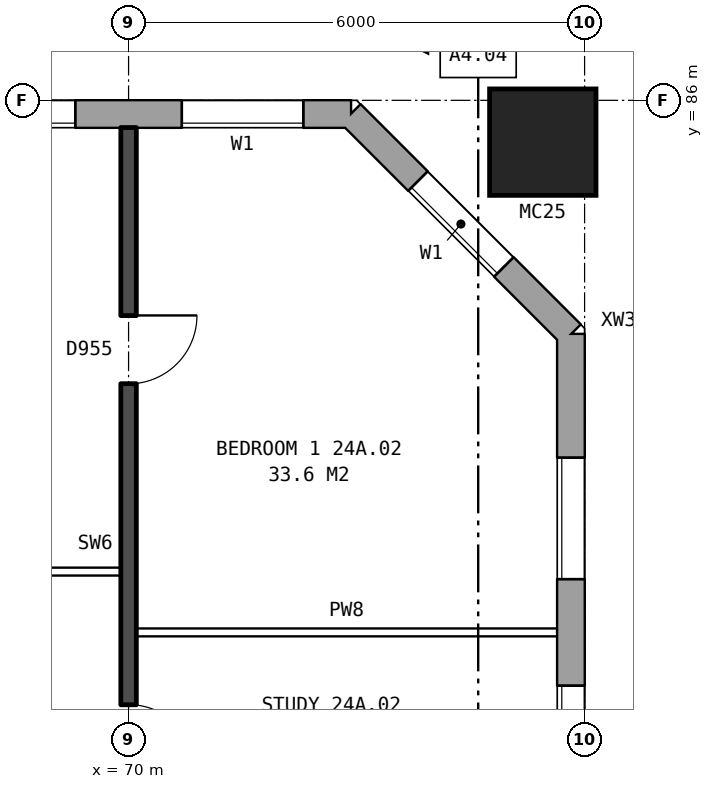
"""IFC4 building model, lengths in metres.
Left out: names, types, materials, properties, quantities, classifications, styles, units other than length and angle.
Written with IfcOpenShell. Run it as: python <this file> out.ifc"""

import sys

from ifc_helpers import new_model, si_unit, direction, frame, frame_2d, origin, origin_2d, place, context, subcontext, project, spatial, rectangle, hollow_rectangle, extrude, element, fill, save


model = new_model("IFC4")
c1 = context("Model", 3, precision=1e-05, world=origin(), true_north=direction((0.0, 1.0)))
c2 = subcontext(c1, "Body", "Model", "MODEL_VIEW")
j1 = project(units=[si_unit("LENGTHUNIT", "METRE"), si_unit("PLANEANGLEUNIT", "RADIAN")], contexts=[c1])
p1 = place(None, origin())
s1 = spatial("IfcSite", under=j1, at=p1, CompositionType="ELEMENT")
p2 = place(p1, origin())
s2 = spatial("IfcBuilding", under=s1, at=p2, CompositionType="ELEMENT")
p3 = place(p2, frame((0.0, 0.0, 87.1)))
s3 = spatial("IfcBuildingStorey", under=s2, at=p3, CompositionType="ELEMENT", Elevation=87.1)
p4 = place(p3, frame((75.45, 85.45, 0.0), z_axis=(0.0, 0.0, 1.0), x_axis=(1.0, 0.0, 0.0)))
e1 = element("IfcColumn", 1, at=p4, inside=s3, PredefinedType="COLUMN", context=c2, shape_type="SweptSolid", body=[
    extrude(hollow_rectangle(XDim=1.4, YDim=1.4, WallThickness=0.075, at=origin_2d()), origin(), (0.0, 0.0, 1.0), 3.1),
])
p5 = place(p3, frame((75.82, 57.075, 0.0), z_axis=(0.0, 0.0, 1.0), x_axis=(0.0, 1.0, 0.0)))
e2 = element("IfcWall", 2, at=p5, inside=s3, PredefinedType="STANDARD", context=c2, shape_type="SweptSolid", body=[
    extrude(rectangle(XDim=25.851, YDim=0.36, at=frame_2d((12.925, 0.0))), origin(), (0.0, 0.0, 1.0), 2.85),
])
p6 = place(p5, frame((1.625, 0.0, 0.8)))
e3 = element("IfcOpeningElement", 3, at=p6, cuts=e2, PredefinedType="OPENING", context=c2, shape_type="SweptSolid", body=[
    extrude(rectangle(XDim=1.6, YDim=1.8, at=frame_2d((0.8, 0.9))), frame((0.0, 0.19, 0.0), z_axis=(0.0, -1.0, 0.0), x_axis=(1.0, 0.0, 0.0)), (0.0, 0.0, 1.0), 0.38),
])
p7 = place(p5, frame((4.625, 0.0, 0.8)))
e4 = element("IfcOpeningElement", 4, at=p7, cuts=e2, PredefinedType="OPENING", context=c2, shape_type="SweptSolid", body=[
    extrude(rectangle(XDim=1.6, YDim=1.8, at=frame_2d((0.8, 0.9))), frame((0.0, 0.19, 0.0), z_axis=(0.0, -1.0, 0.0), x_axis=(1.0, 0.0, 0.0)), (0.0, 0.0, 1.0), 0.38),
])
p8 = place(p5, frame((19.625, 0.0, 0.8)))
e5 = element("IfcOpeningElement", 5, at=p8, cuts=e2, PredefinedType="OPENING", context=c2, shape_type="SweptSolid", body=[
    extrude(rectangle(XDim=1.6, YDim=1.8, at=frame_2d((0.8, 0.9))), frame((0.0, 0.19, 0.0), z_axis=(0.0, -1.0, 0.0), x_axis=(1.0, 0.0, 0.0)), (0.0, 0.0, 1.0), 0.38),
])
p9 = place(p5, frame((22.625, 0.0, 0.8)))
e6 = element("IfcOpeningElement", 6, at=p9, cuts=e2, PredefinedType="OPENING", context=c2, shape_type="SweptSolid", body=[
    extrude(rectangle(XDim=1.6, YDim=1.8, at=frame_2d((0.8, 0.9))), frame((0.0, 0.19, 0.0), z_axis=(0.0, -1.0, 0.0), x_axis=(1.0, 0.0, 0.0)), (0.0, 0.0, 1.0), 0.38),
])
p10 = place(p3, frame((75.82, 82.925, 0.0), z_axis=(0.0, 0.0, 1.0), x_axis=(-0.707106781187, 0.707106781187, 0.0)))
e7 = element("IfcWall", 7, at=p10, inside=s3, PredefinedType="STANDARD", context=c2, shape_type="SweptSolid", body=[
    extrude(rectangle(XDim=4.094, YDim=0.36, at=frame_2d((2.047, 0.0))), origin(), (0.0, 0.0, 1.0), 2.85),
])
p11 = place(p10, frame((1.247, 0.0, 0.8)))
e8 = element("IfcOpeningElement", 8, at=p11, cuts=e7, PredefinedType="OPENING", context=c2, shape_type="SweptSolid", body=[
    extrude(rectangle(XDim=1.6, YDim=1.8, at=frame_2d((0.8, 0.9))), frame((0.0, 0.19, 0.0), z_axis=(0.0, -1.0, 0.0), x_axis=(1.0, 0.0, 0.0)), (0.0, 0.0, 1.0), 0.38),
])
p12 = place(p3, frame((72.925, 85.82, 0.0), z_axis=(0.0, 0.0, 1.0), x_axis=(-1.0, 0.0, 0.0)))
e9 = element("IfcWall", 9, at=p12, inside=s3, PredefinedType="STANDARD", context=c2, shape_type="SweptSolid", body=[
    extrude(rectangle(XDim=46.601, YDim=0.36, at=frame_2d((23.3, 0.0))), origin(), (0.0, 0.0, 1.0), 2.85),
])
p13 = place(p12, frame((0.625, 0.0, 0.8)))
e10 = element("IfcOpeningElement", 10, at=p13, cuts=e9, PredefinedType="OPENING", context=c2, shape_type="SweptSolid", body=[
    extrude(rectangle(XDim=1.6, YDim=1.8, at=frame_2d((0.8, 0.9))), frame((0.0, 0.19, 0.0), z_axis=(0.0, -1.0, 0.0), x_axis=(1.0, 0.0, 0.0)), (0.0, 0.0, 1.0), 0.38),
])
p14 = place(p12, frame((3.625, 0.0, 0.8)))
e11 = element("IfcOpeningElement", 11, at=p14, cuts=e9, PredefinedType="OPENING", context=c2, shape_type="SweptSolid", body=[
    extrude(rectangle(XDim=1.6, YDim=1.8, at=frame_2d((0.8, 0.9))), frame((0.0, 0.19, 0.0), z_axis=(0.0, -1.0, 0.0), x_axis=(1.0, 0.0, 0.0)), (0.0, 0.0, 1.0), 0.38),
])
p15 = place(p12, frame((6.625, 0.0, 0.8)))
e12 = element("IfcOpeningElement", 12, at=p15, cuts=e9, PredefinedType="OPENING", context=c2, shape_type="SweptSolid", body=[
    extrude(rectangle(XDim=1.6, YDim=1.8, at=frame_2d((0.8, 0.9))), frame((0.0, 0.19, 0.0), z_axis=(0.0, -1.0, 0.0), x_axis=(1.0, 0.0, 0.0)), (0.0, 0.0, 1.0), 0.38),
])
p16 = place(p12, frame((9.625, 0.0, 0.8)))
e13 = element("IfcOpeningElement", 13, at=p16, cuts=e9, PredefinedType="OPENING", context=c2, shape_type="SweptSolid", body=[
    extrude(rectangle(XDim=1.6, YDim=1.8, at=frame_2d((0.8, 0.9))), frame((0.0, 0.19, 0.0), z_axis=(0.0, -1.0, 0.0), x_axis=(1.0, 0.0, 0.0)), (0.0, 0.0, 1.0), 0.38),
])
p17 = place(p12, frame((12.625, 0.0, 0.8)))
e14 = element("IfcOpeningElement", 14, at=p17, cuts=e9, PredefinedType="OPENING", context=c2, shape_type="SweptSolid", body=[
    extrude(rectangle(XDim=1.6, YDim=1.8, at=frame_2d((0.8, 0.9))), frame((0.0, 0.19, 0.0), z_axis=(0.0, -1.0, 0.0), x_axis=(1.0, 0.0, 0.0)), (0.0, 0.0, 1.0), 0.38),
])
p18 = place(p12, frame((15.625, 0.0, 0.8)))
e15 = element("IfcOpeningElement", 15, at=p18, cuts=e9, PredefinedType="OPENING", context=c2, shape_type="SweptSolid", body=[
    extrude(rectangle(XDim=1.6, YDim=1.8, at=frame_2d((0.8, 0.9))), frame((0.0, 0.19, 0.0), z_axis=(0.0, -1.0, 0.0), x_axis=(1.0, 0.0, 0.0)), (0.0, 0.0, 1.0), 0.38),
])
p19 = place(p12, frame((18.625, 0.0, 0.8)))
e16 = element("IfcOpeningElement", 16, at=p19, cuts=e9, PredefinedType="OPENING", context=c2, shape_type="SweptSolid", body=[
    extrude(rectangle(XDim=1.6, YDim=1.8, at=frame_2d((0.8, 0.9))), frame((0.0, 0.19, 0.0), z_axis=(0.0, -1.0, 0.0), x_axis=(1.0, 0.0, 0.0)), (0.0, 0.0, 1.0), 0.38),
])
p20 = place(p12, frame((22.025, 0.0, 0.15)))
e17 = element("IfcOpeningElement", 17, at=p20, cuts=e9, PredefinedType="OPENING", context=c2, shape_type="SweptSolid", body=[
    extrude(rectangle(XDim=0.6, YDim=0.9, at=frame_2d((0.3, 0.45))), frame((0.0, 0.19, 0.0), z_axis=(0.0, -1.0, 0.0), x_axis=(1.0, 0.0, 0.0)), (0.0, 0.0, 1.0), 0.38),
])
p21 = place(p12, frame((25.475, 0.0, 1.4)))
e18 = element("IfcOpeningElement", 18, at=p21, cuts=e9, PredefinedType="OPENING", context=c2, shape_type="SweptSolid", body=[
    extrude(rectangle(XDim=1.2, YDim=1.2, at=frame_2d((0.6, 0.6))), frame((0.0, 0.19, 0.0), z_axis=(0.0, -1.0, 0.0), x_axis=(1.0, 0.0, 0.0)), (0.0, 0.0, 1.0), 0.38),
])
p22 = place(p12, frame((27.625, 0.0, 0.8)))
e19 = element("IfcOpeningElement", 19, at=p22, cuts=e9, PredefinedType="OPENING", context=c2, shape_type="SweptSolid", body=[
    extrude(rectangle(XDim=1.6, YDim=1.8, at=frame_2d((0.8, 0.9))), frame((0.0, 0.19, 0.0), z_axis=(0.0, -1.0, 0.0), x_axis=(1.0, 0.0, 0.0)), (0.0, 0.0, 1.0), 0.38),
])
p23 = place(p12, frame((30.625, 0.0, 0.8)))
e20 = element("IfcOpeningElement", 20, at=p23, cuts=e9, PredefinedType="OPENING", context=c2, shape_type="SweptSolid", body=[
    extrude(rectangle(XDim=1.6, YDim=1.8, at=frame_2d((0.8, 0.9))), frame((0.0, 0.19, 0.0), z_axis=(0.0, -1.0, 0.0), x_axis=(1.0, 0.0, 0.0)), (0.0, 0.0, 1.0), 0.38),
])
p24 = place(p12, frame((33.625, 0.0, 0.8)))
e21 = element("IfcOpeningElement", 21, at=p24, cuts=e9, PredefinedType="OPENING", context=c2, shape_type="SweptSolid", body=[
    extrude(rectangle(XDim=1.6, YDim=1.8, at=frame_2d((0.8, 0.9))), frame((0.0, 0.19, 0.0), z_axis=(0.0, -1.0, 0.0), x_axis=(1.0, 0.0, 0.0)), (0.0, 0.0, 1.0), 0.38),
])
p25 = place(p12, frame((36.625, 0.0, 0.8)))
e22 = element("IfcOpeningElement", 22, at=p25, cuts=e9, PredefinedType="OPENING", context=c2, shape_type="SweptSolid", body=[
    extrude(rectangle(XDim=1.6, YDim=1.8, at=frame_2d((0.8, 0.9))), frame((0.0, 0.19, 0.0), z_axis=(0.0, -1.0, 0.0), x_axis=(1.0, 0.0, 0.0)), (0.0, 0.0, 1.0), 0.38),
])
p26 = place(p12, frame((39.625, 0.0, 0.8)))
e23 = element("IfcOpeningElement", 23, at=p26, cuts=e9, PredefinedType="OPENING", context=c2, shape_type="SweptSolid", body=[
    extrude(rectangle(XDim=1.6, YDim=1.8, at=frame_2d((0.8, 0.9))), frame((0.0, 0.19, 0.0), z_axis=(0.0, -1.0, 0.0), x_axis=(1.0, 0.0, 0.0)), (0.0, 0.0, 1.0), 0.38),
])
p27 = place(p12, frame((42.625, 0.0, 0.8)))
e24 = element("IfcOpeningElement", 24, at=p27, cuts=e9, PredefinedType="OPENING", context=c2, shape_type="SweptSolid", body=[
    extrude(rectangle(XDim=1.6, YDim=1.8, at=frame_2d((0.8, 0.9))), frame((0.0, 0.19, 0.0), z_axis=(0.0, -1.0, 0.0), x_axis=(1.0, 0.0, 0.0)), (0.0, 0.0, 1.0), 0.38),
])
p28 = place(p12, frame((22.925, 0.0, 0.25)))
e25 = element("IfcOpeningElement", 25, at=p28, cuts=e9, PredefinedType="OPENING", context=c2, shape_type="SweptSolid", body=[
    extrude(rectangle(XDim=0.8, YDim=1.5, at=frame_2d((0.4, 0.75))), frame((0.0, 0.19, 0.0), z_axis=(0.0, -1.0, 0.0), x_axis=(1.0, 0.0, 0.0)), (0.0, 0.0, 1.0), 0.38),
])
p29 = place(p3, frame((70.1, 79.0, 0.0), z_axis=(0.0, 0.0, 1.0), x_axis=(1.0, 0.0, 0.0)))
e26 = element("IfcWall", 26, at=p29, inside=s3, PredefinedType="PARTITIONING", context=c2, shape_type="SweptSolid", body=[
    extrude(rectangle(XDim=5.54, YDim=0.1, at=frame_2d((2.77, 0.0))), origin(), (0.0, 0.0, 1.0), 2.85),
])
p30 = place(p3, frame((64.1, 79.8, 0.0), z_axis=(0.0, 0.0, 1.0), x_axis=(1.0, 0.0, 0.0)))
e27 = element("IfcWall", 27, at=p30, inside=s3, PredefinedType="PARTITIONING", context=c2, shape_type="SweptSolid", body=[
    extrude(rectangle(XDim=5.8, YDim=0.1, at=frame_2d((2.9, 0.0))), origin(), (0.0, 0.0, 1.0), 2.85),
])
p31 = place(p30, frame((3.6, 0.0, 0.0)))
e28 = element("IfcOpeningElement", 28, at=p31, cuts=e27, PredefinedType="OPENING", context=c2, shape_type="SweptSolid", body=[
    extrude(rectangle(XDim=0.9, YDim=2.1, at=frame_2d((0.45, 1.05))), frame((0.0, 0.06, 0.0), z_axis=(0.0, -1.0, 0.0), x_axis=(1.0, 0.0, 0.0)), (0.0, 0.0, 1.0), 0.12),
])
p32 = place(p30, frame((0.7, 0.0, 0.0)))
e29 = element("IfcOpeningElement", 29, at=p32, cuts=e27, PredefinedType="OPENING", context=c2, shape_type="SweptSolid", body=[
    extrude(rectangle(XDim=0.9, YDim=2.1, at=frame_2d((0.45, 1.05))), frame((0.0, 0.06, 0.0), z_axis=(0.0, -1.0, 0.0), x_axis=(1.0, 0.0, 0.0)), (0.0, 0.0, 1.0), 0.12),
])
p33 = place(p3, frame((70.0, 76.2, 0.0), z_axis=(0.0, 0.0, 1.0), x_axis=(0.0, 1.0, 0.0)))
e30 = element("IfcWall", 30, at=p33, inside=s3, PredefinedType="SOLIDWALL", context=c2, shape_type="SweptSolid", body=[
    extrude(rectangle(XDim=9.44, YDim=0.2, at=frame_2d((4.72, 0.0))), origin(), (0.0, 0.0, 1.0), 2.85),
])
p34 = place(p33, frame((6.07, 0.0, 0.0)))
e31 = element("IfcOpeningElement", 31, at=p34, cuts=e30, PredefinedType="OPENING", context=c2, shape_type="SweptSolid", body=[
    extrude(rectangle(XDim=0.9, YDim=2.1, at=frame_2d((0.45, 1.05))), frame((0.0, 0.11, 0.0), z_axis=(0.0, -1.0, 0.0), x_axis=(1.0, 0.0, 0.0)), (0.0, 0.0, 1.0), 0.22),
])
p35 = place(p33, frame((0.95, 0.0, 0.0)))
e32 = element("IfcOpeningElement", 32, at=p35, cuts=e30, PredefinedType="OPENING", context=c2, shape_type="SweptSolid", body=[
    extrude(rectangle(XDim=0.9, YDim=2.1, at=frame_2d((0.45, 1.05))), frame((0.0, 0.11, 0.0), z_axis=(0.0, -1.0, 0.0), x_axis=(1.0, 0.0, 0.0)), (0.0, 0.0, 1.0), 0.22),
])
p36 = place(p8, origin())
e33 = element("IfcWindow", 33, at=p36, inside=s3, PartitioningType="SINGLE_PANEL", PredefinedType="WINDOW", context=c2, shape_type="SweptSolid", body=[
    extrude(rectangle(XDim=1.6, YDim=1.8, at=frame_2d((0.8, 0.9))), frame((0.0, 0.15, 0.0), z_axis=(0.0, -1.0, 0.0), x_axis=(1.0, 0.0, 0.0)), (0.0, 0.0, 1.0), 0.06),
])
fill(e5, e33)
p37 = place(p9, origin())
e34 = element("IfcWindow", 34, at=p37, inside=s3, PartitioningType="SINGLE_PANEL", PredefinedType="WINDOW", context=c2, shape_type="SweptSolid", body=[
    extrude(rectangle(XDim=1.6, YDim=1.8, at=frame_2d((0.8, 0.9))), frame((0.0, 0.15, 0.0), z_axis=(0.0, -1.0, 0.0), x_axis=(1.0, 0.0, 0.0)), (0.0, 0.0, 1.0), 0.06),
])
fill(e6, e34)
p38 = place(p11, origin())
e35 = element("IfcWindow", 35, at=p38, inside=s3, PartitioningType="SINGLE_PANEL", PredefinedType="WINDOW", context=c2, shape_type="SweptSolid", body=[
    extrude(rectangle(XDim=1.6, YDim=1.8, at=frame_2d((0.8, 0.9))), frame((0.0, 0.15, 0.0), z_axis=(0.0, -1.0, 0.0), x_axis=(1.0, 0.0, 0.0)), (0.0, 0.0, 1.0), 0.06),
])
fill(e8, e35)
p39 = place(p13, origin())
e36 = element("IfcWindow", 36, at=p39, inside=s3, PartitioningType="SINGLE_PANEL", PredefinedType="WINDOW", context=c2, shape_type="SweptSolid", body=[
    extrude(rectangle(XDim=1.6, YDim=1.8, at=frame_2d((0.8, 0.9))), frame((0.0, 0.15, 0.0), z_axis=(0.0, -1.0, 0.0), x_axis=(1.0, 0.0, 0.0)), (0.0, 0.0, 1.0), 0.06),
])
fill(e10, e36)
p40 = place(p14, origin())
e37 = element("IfcWindow", 37, at=p40, inside=s3, PartitioningType="SINGLE_PANEL", PredefinedType="WINDOW", context=c2, shape_type="SweptSolid", body=[
    extrude(rectangle(XDim=1.6, YDim=1.8, at=frame_2d((0.8, 0.9))), frame((0.0, 0.15, 0.0), z_axis=(0.0, -1.0, 0.0), x_axis=(1.0, 0.0, 0.0)), (0.0, 0.0, 1.0), 0.06),
])
fill(e11, e37)
p41 = place(p34, frame((0.9, 0.0, 0.0), z_axis=(0.0, 0.0, 1.0), x_axis=(-1.0, 0.0, 0.0)))
e38 = element("IfcDoor", 38, at=p41, inside=s3, OperationType="SINGLE_SWING_LEFT", PredefinedType="DOOR", context=c2, shape_type="SweptSolid", body=[
    extrude(rectangle(XDim=0.9, YDim=2.1, at=frame_2d((0.45, 1.05))), frame((0.0, 0.025, 0.0), z_axis=(0.0, -1.0, 0.0), x_axis=(1.0, 0.0, 0.0)), (0.0, 0.0, 1.0), 0.05),
])
fill(e31, e38)
p42 = place(p35, frame((0.9, 0.0, 0.0), z_axis=(0.0, 0.0, 1.0), x_axis=(-1.0, 0.0, 0.0)))
e39 = element("IfcDoor", 39, at=p42, inside=s3, OperationType="SINGLE_SWING_RIGHT", PredefinedType="DOOR", context=c2, shape_type="SweptSolid", body=[
    extrude(rectangle(XDim=0.9, YDim=2.1, at=frame_2d((0.45, 1.05))), frame((0.0, 0.025, 0.0), z_axis=(0.0, -1.0, 0.0), x_axis=(1.0, 0.0, 0.0)), (0.0, 0.0, 1.0), 0.05),
])
fill(e32, e39)
save(model, sys.argv[1])
